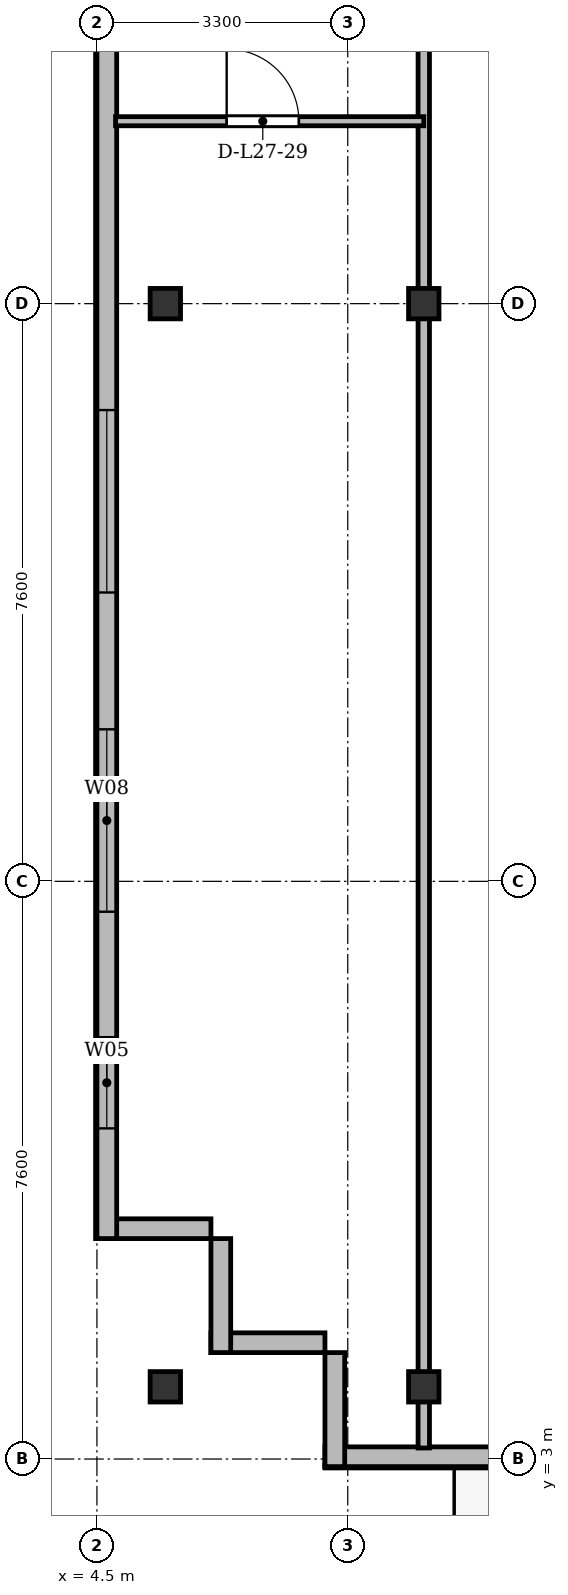
"""IFC4 building model, lengths in metres.
Left out: names, types, materials, properties, quantities, classifications, styles, units other than length and angle.
Written with IfcOpenShell. Run it as: python <this file> out.ifc"""

import sys

from ifc_helpers import new_model, si_unit, direction, frame, frame_2d, origin, origin_2d, place, context, subcontext, project, spatial, rectangle, i_section, extrude, source, transform, mapped, element, fill, save


model = new_model("IFC4")
c1 = context("Model", 3, precision=1e-05, world=origin(), true_north=direction((0.0, 1.0)))
c2 = subcontext(c1, "Body", "Model", "MODEL_VIEW")
j1 = project(units=[si_unit("LENGTHUNIT", "METRE"), si_unit("PLANEANGLEUNIT", "RADIAN")], contexts=[c1])
p1 = place(None, origin())
s1 = spatial("IfcSite", under=j1, at=p1, CompositionType="ELEMENT")
p2 = place(p1, origin())
s2 = spatial("IfcBuilding", under=s1, at=p2, CompositionType="ELEMENT")
p3 = place(p2, frame((0.0, 0.0, 106.9)))
s3 = spatial("IfcBuildingStorey", under=s2, at=p3, CompositionType="ELEMENT", Elevation=106.9)
m1 = source(origin(), c2, "Body", "SweptSolid", [
    extrude(i_section(OverallWidth=0.4, OverallDepth=0.4, WebThickness=0.022, FlangeThickness=0.035, at=origin_2d()), origin(), (0.0, 0.0, 1.0), 3.6),
])
for number, where, z_axis, x_axis in (
    (1, (5.4, 3.95, 0.0), (0.0, 0.0, 1.0), (1.0, 0.0, 0.0)),
    (2, (5.4, 18.2, 0.0), (0.0, 0.0, 1.0), (1.0, 0.0, 0.0)),
    (3, (8.8, 3.95, 0.0), (0.0, 0.0, 1.0), (1.0, 0.0, 0.0)),
    (4, (8.8, 18.2, 0.0), (0.0, 0.0, 1.0), (1.0, 0.0, 0.0)),
):
    element("IfcColumn", number, at=place(p3, frame(where, z_axis=z_axis, x_axis=x_axis)), inside=s3, PredefinedType="COLUMN", context=c2, shape_type="MappedRepresentation", body=[
        mapped(m1, transform((0.0, 0.0, 0.0), x_axis=(1.0, 0.0, 0.0), y_axis=(0.0, 1.0, 0.0), z_axis=(0.0, 0.0, 1.0), scale=1.0)),
    ])
for number, where, z_axis, x_axis in (
    (5, (7.5, 4.53, 0.0), (0.0, 0.0, 1.0), (-1.0, 0.0, 0.0)),
    (6, (6.13, 4.4, 0.0), (0.0, 0.0, 1.0), (0.0, 1.0, 0.0)),
):
    element("IfcWall", number, at=place(p3, frame(where, z_axis=z_axis, x_axis=x_axis)), inside=s3, PredefinedType="SOLIDWALL", context=c2, shape_type="SweptSolid", body=[
        extrude(rectangle(XDim=1.5, YDim=0.26, at=frame_2d((0.75, 0.0))), origin(), (0.0, 0.0, 1.0), 3.34),
    ])
p4 = place(p3, frame((6.0, 6.03, 0.0), z_axis=(0.0, 0.0, 1.0), x_axis=(-1.0, 0.0, 0.0)))
e7 = element("IfcWall", 7, at=p4, inside=s3, PredefinedType="SOLIDWALL", context=c2, shape_type="SweptSolid", body=[
    extrude(rectangle(XDim=1.5, YDim=0.26, at=frame_2d((0.75, 0.0))), origin(), (0.0, 0.0, 1.0), 2.84),
])
p5 = place(p3, frame((4.63, 5.9, 0.0), z_axis=(0.0, 0.0, 1.0), x_axis=(0.0, 1.0, 0.0)))
e8 = element("IfcWall", 8, at=p5, inside=s3, PredefinedType="SOLIDWALL", context=c2, shape_type="SweptSolid", body=[
    extrude(rectangle(XDim=39.6, YDim=0.26, at=frame_2d((19.8, 0.0))), origin(), (0.0, 0.0, 1.0), 3.34),
])
p6 = place(p5, frame((1.45, 0.0, 0.92)))
e9 = element("IfcOpeningElement", 9, at=p6, cuts=e8, PredefinedType="OPENING", context=c2, shape_type="SweptSolid", body=[
    extrude(rectangle(XDim=1.2, YDim=1.65, at=frame_2d((0.6, 0.825))), frame((0.0, 0.14, 0.0), z_axis=(0.0, -1.0, 0.0), x_axis=(1.0, 0.0, 0.0)), (0.0, 0.0, 1.0), 0.28),
])
p7 = place(p5, frame((4.3, 0.0, 0.92)))
e10 = element("IfcOpeningElement", 10, at=p7, cuts=e8, PredefinedType="OPENING", context=c2, shape_type="SweptSolid", body=[
    extrude(rectangle(XDim=2.4, YDim=2.1, at=frame_2d((1.2, 1.05))), frame((0.0, 0.14, 0.0), z_axis=(0.0, -1.0, 0.0), x_axis=(1.0, 0.0, 0.0)), (0.0, 0.0, 1.0), 0.28),
])
p8 = place(p5, frame((8.5, 0.0, 0.92)))
e11 = element("IfcOpeningElement", 11, at=p8, cuts=e8, PredefinedType="OPENING", context=c2, shape_type="SweptSolid", body=[
    extrude(rectangle(XDim=2.4, YDim=2.1, at=frame_2d((1.2, 1.05))), frame((0.0, 0.14, 0.0), z_axis=(0.0, -1.0, 0.0), x_axis=(1.0, 0.0, 0.0)), (0.0, 0.0, 1.0), 0.28),
])
p9 = place(p5, frame((15.7, 0.0, 0.92)))
e12 = element("IfcOpeningElement", 12, at=p9, cuts=e8, PredefinedType="OPENING", context=c2, shape_type="SweptSolid", body=[
    extrude(rectangle(XDim=2.4, YDim=2.1, at=frame_2d((1.2, 1.05))), frame((0.0, 0.14, 0.0), z_axis=(0.0, -1.0, 0.0), x_axis=(1.0, 0.0, 0.0)), (0.0, 0.0, 1.0), 0.28),
])
p10 = place(p5, frame((29.7, 0.0, 0.92)))
e13 = element("IfcOpeningElement", 13, at=p10, cuts=e8, PredefinedType="OPENING", context=c2, shape_type="SweptSolid", body=[
    extrude(rectangle(XDim=2.4, YDim=2.1, at=frame_2d((1.2, 1.05))), frame((0.0, 0.14, 0.0), z_axis=(0.0, -1.0, 0.0), x_axis=(1.0, 0.0, 0.0)), (0.0, 0.0, 1.0), 0.28),
])
p11 = place(p5, frame((33.9, 0.0, 0.92)))
e14 = element("IfcOpeningElement", 14, at=p11, cuts=e8, PredefinedType="OPENING", context=c2, shape_type="SweptSolid", body=[
    extrude(rectangle(XDim=1.2, YDim=1.65, at=frame_2d((0.6, 0.825))), frame((0.0, 0.14, 0.0), z_axis=(0.0, -1.0, 0.0), x_axis=(1.0, 0.0, 0.0)), (0.0, 0.0, 1.0), 0.28),
])
p12 = place(p5, frame((37.25, 0.0, 0.92)))
e15 = element("IfcOpeningElement", 15, at=p12, cuts=e8, PredefinedType="OPENING", context=c2, shape_type="SweptSolid", body=[
    extrude(rectangle(XDim=1.2, YDim=1.65, at=frame_2d((0.6, 0.825))), frame((0.0, 0.14, 0.0), z_axis=(0.0, -1.0, 0.0), x_axis=(1.0, 0.0, 0.0)), (0.0, 0.0, 1.0), 0.28),
])
p13 = place(p3, frame((66.9, 3.03, 0.0), z_axis=(0.0, 0.0, 1.0), x_axis=(-1.0, 0.0, 0.0)))
e16 = element("IfcWall", 16, at=p13, inside=s3, PredefinedType="SOLIDWALL", context=c2, shape_type="SweptSolid", body=[
    extrude(rectangle(XDim=59.4, YDim=0.26, at=frame_2d((29.7, 0.0))), origin(), (0.0, 0.0, 1.0), 3.34),
])
p14 = place(p13, frame((2.0, 0.0, 0.9)))
e17 = element("IfcOpeningElement", 17, at=p14, cuts=e16, PredefinedType="OPENING", context=c2, shape_type="SweptSolid", body=[
    extrude(rectangle(XDim=2.0, YDim=1.95, at=frame_2d((1.0, 0.975))), frame((0.0, 0.14, 0.0), z_axis=(0.0, -1.0, 0.0), x_axis=(1.0, 0.0, 0.0)), (0.0, 0.0, 1.0), 0.28),
])
p15 = place(p13, frame((5.575, 0.0, 0.9)))
e18 = element("IfcOpeningElement", 18, at=p15, cuts=e16, PredefinedType="OPENING", context=c2, shape_type="SweptSolid", body=[
    extrude(rectangle(XDim=1.65, YDim=1.85, at=frame_2d((0.825, 0.925))), frame((0.0, 0.14, 0.0), z_axis=(0.0, -1.0, 0.0), x_axis=(1.0, 0.0, 0.0)), (0.0, 0.0, 1.0), 0.28),
])
p16 = place(p13, frame((9.213, 0.0, 0.0)))
e19 = element("IfcOpeningElement", 19, at=p16, cuts=e16, PredefinedType="OPENING", context=c2, shape_type="SweptSolid", body=[
    extrude(rectangle(XDim=1.2, YDim=2.2, at=frame_2d((0.6, 1.1))), frame((0.0, 0.14, 0.0), z_axis=(0.0, -1.0, 0.0), x_axis=(1.0, 0.0, 0.0)), (0.0, 0.0, 1.0), 0.28),
])
p17 = place(p13, frame((12.8, 0.0, 0.9)))
e20 = element("IfcOpeningElement", 20, at=p17, cuts=e16, PredefinedType="OPENING", context=c2, shape_type="SweptSolid", body=[
    extrude(rectangle(XDim=2.2, YDim=1.8, at=frame_2d((1.1, 0.9))), frame((0.0, 0.14, 0.0), z_axis=(0.0, -1.0, 0.0), x_axis=(1.0, 0.0, 0.0)), (0.0, 0.0, 1.0), 0.28),
])
p18 = place(p13, frame((16.95, 0.0, 0.9)))
e21 = element("IfcOpeningElement", 21, at=p18, cuts=e16, PredefinedType="OPENING", context=c2, shape_type="SweptSolid", body=[
    extrude(rectangle(XDim=1.5, YDim=1.75, at=frame_2d((0.75, 0.875))), frame((0.0, 0.14, 0.0), z_axis=(0.0, -1.0, 0.0), x_axis=(1.0, 0.0, 0.0)), (0.0, 0.0, 1.0), 0.28),
])
p19 = place(p13, frame((20.3, 0.0, 0.9)))
e22 = element("IfcOpeningElement", 22, at=p19, cuts=e16, PredefinedType="OPENING", context=c2, shape_type="SweptSolid", body=[
    extrude(rectangle(XDim=2.0, YDim=1.95, at=frame_2d((1.0, 0.975))), frame((0.0, 0.14, 0.0), z_axis=(0.0, -1.0, 0.0), x_axis=(1.0, 0.0, 0.0)), (0.0, 0.0, 1.0), 0.28),
])
p20 = place(p13, frame((25.575, 0.0, 0.9)))
e23 = element("IfcOpeningElement", 23, at=p20, cuts=e16, PredefinedType="OPENING", context=c2, shape_type="SweptSolid", body=[
    extrude(rectangle(XDim=1.65, YDim=1.85, at=frame_2d((0.825, 0.925))), frame((0.0, 0.14, 0.0), z_axis=(0.0, -1.0, 0.0), x_axis=(1.0, 0.0, 0.0)), (0.0, 0.0, 1.0), 0.28),
])
p21 = place(p13, frame((32.1, 0.0, 0.9)))
e24 = element("IfcOpeningElement", 24, at=p21, cuts=e16, PredefinedType="OPENING", context=c2, shape_type="SweptSolid", body=[
    extrude(rectangle(XDim=1.8, YDim=1.8, at=frame_2d((0.9, 0.9))), frame((0.0, 0.14, 0.0), z_axis=(0.0, -1.0, 0.0), x_axis=(1.0, 0.0, 0.0)), (0.0, 0.0, 1.0), 0.28),
])
p22 = place(p13, frame((37.584, 0.0, 0.0)))
e25 = element("IfcOpeningElement", 25, at=p22, cuts=e16, PredefinedType="OPENING", context=c2, shape_type="SweptSolid", body=[
    extrude(rectangle(XDim=1.2, YDim=2.2, at=frame_2d((0.6, 1.1))), frame((0.0, 0.14, 0.0), z_axis=(0.0, -1.0, 0.0), x_axis=(1.0, 0.0, 0.0)), (0.0, 0.0, 1.0), 0.28),
])
p23 = place(p13, frame((40.85, 0.0, 0.9)))
e26 = element("IfcOpeningElement", 26, at=p23, cuts=e16, PredefinedType="OPENING", context=c2, shape_type="SweptSolid", body=[
    extrude(rectangle(XDim=1.5, YDim=1.75, at=frame_2d((0.75, 0.875))), frame((0.0, 0.14, 0.0), z_axis=(0.0, -1.0, 0.0), x_axis=(1.0, 0.0, 0.0)), (0.0, 0.0, 1.0), 0.28),
])
p24 = place(p13, frame((46.4, 0.0, 0.9)))
e27 = element("IfcOpeningElement", 27, at=p24, cuts=e16, PredefinedType="OPENING", context=c2, shape_type="SweptSolid", body=[
    extrude(rectangle(XDim=2.0, YDim=1.95, at=frame_2d((1.0, 0.975))), frame((0.0, 0.14, 0.0), z_axis=(0.0, -1.0, 0.0), x_axis=(1.0, 0.0, 0.0)), (0.0, 0.0, 1.0), 0.28),
])
p25 = place(p13, frame((55.817, 0.0, 0.0)))
e28 = element("IfcOpeningElement", 28, at=p25, cuts=e16, PredefinedType="OPENING", context=c2, shape_type="SweptSolid", body=[
    extrude(rectangle(XDim=1.2, YDim=2.2, at=frame_2d((0.6, 1.1))), frame((0.0, 0.14, 0.0), z_axis=(0.0, -1.0, 0.0), x_axis=(1.0, 0.0, 0.0)), (0.0, 0.0, 1.0), 0.28),
])
p26 = place(p3, frame((7.63, 2.9, 0.0), z_axis=(0.0, 0.0, 1.0), x_axis=(0.0, 1.0, 0.0)))
e29 = element("IfcWall", 29, at=p26, inside=s3, PredefinedType="SOLIDWALL", context=c2, shape_type="SweptSolid", body=[
    extrude(rectangle(XDim=1.5, YDim=0.26, at=frame_2d((0.75, 0.0))), origin(), (0.0, 0.0, 1.0), 2.752),
])
p27 = place(p3, frame((8.8, 3.145, 0.0), z_axis=(0.0, 0.0, 1.0), x_axis=(0.0, 1.0, 0.0)))
e30 = element("IfcWall", 30, at=p27, inside=s3, PredefinedType="PARTITIONING", context=c2, shape_type="SweptSolid", body=[
    extrude(rectangle(XDim=24.455, YDim=0.15, at=frame_2d((12.228, 0.0))), origin(), (0.0, 0.0, 1.0), 2.84),
])
p28 = place(p3, frame((4.745, 20.6, 0.0), z_axis=(0.0, 0.0, 1.0), x_axis=(1.0, 0.0, 0.0)))
e31 = element("IfcWall", 31, at=p28, inside=s3, PredefinedType="PARTITIONING", context=c2, shape_type="SweptSolid", body=[
    extrude(rectangle(XDim=4.055, YDim=0.12, at=frame_2d((2.027, 0.0))), origin(), (0.0, 0.0, 1.0), 2.84),
])
p29 = place(p28, frame((1.462, 0.0, 0.0)))
e32 = element("IfcOpeningElement", 32, at=p29, cuts=e31, PredefinedType="OPENING", context=c2, shape_type="SweptSolid", body=[
    extrude(rectangle(XDim=0.95, YDim=2.15, at=frame_2d((0.475, 1.075))), frame((0.0, 0.07, 0.0), z_axis=(0.0, -1.0, 0.0), x_axis=(1.0, 0.0, 0.0)), (0.0, 0.0, 1.0), 0.14),
])
m2 = source(origin(), c2, "Body", "SweptSolid", [
    extrude(rectangle(XDim=1.2, YDim=1.65, at=frame_2d((0.6, 0.825))), frame((0.0, 0.03, 0.0), z_axis=(0.0, -1.0, 0.0), x_axis=(1.0, 0.0, 0.0)), (0.0, 0.0, 1.0), 0.06),
])
p30 = place(p6, origin())
e33 = element("IfcWindow", 33, at=p30, inside=s3, PartitioningType="SINGLE_PANEL", PredefinedType="WINDOW", context=c2, shape_type="MappedRepresentation", body=[
    mapped(m2, transform((0.0, 0.0, 0.0), x_axis=(1.0, 0.0, 0.0), y_axis=(0.0, 1.0, 0.0), z_axis=(0.0, 0.0, 1.0), scale=1.0)),
])
fill(e9, e33)
m3 = source(origin(), c2, "Body", "SweptSolid", [
    extrude(rectangle(XDim=2.4, YDim=2.1, at=frame_2d((1.2, 1.05))), frame((0.0, 0.03, 0.0), z_axis=(0.0, -1.0, 0.0), x_axis=(1.0, 0.0, 0.0)), (0.0, 0.0, 1.0), 0.06),
])
p31 = place(p7, origin())
e34 = element("IfcWindow", 34, at=p31, inside=s3, PartitioningType="SINGLE_PANEL", PredefinedType="WINDOW", context=c2, shape_type="MappedRepresentation", body=[
    mapped(m3, transform((0.0, 0.0, 0.0), x_axis=(1.0, 0.0, 0.0), y_axis=(0.0, 1.0, 0.0), z_axis=(0.0, 0.0, 1.0), scale=1.0)),
])
fill(e10, e34)
p32 = place(p8, origin())
e35 = element("IfcWindow", 35, at=p32, inside=s3, PartitioningType="SINGLE_PANEL", PredefinedType="WINDOW", context=c2, shape_type="MappedRepresentation", body=[
    mapped(m3, transform((0.0, 0.0, 0.0), x_axis=(1.0, 0.0, 0.0), y_axis=(0.0, 1.0, 0.0), z_axis=(0.0, 0.0, 1.0), scale=1.0)),
])
fill(e11, e35)
m4 = source(origin(), c2, "Body", "SweptSolid", [
    extrude(rectangle(XDim=0.95, YDim=2.15, at=frame_2d((0.475, 1.075))), frame((0.0, 0.025, 0.0), z_axis=(0.0, -1.0, 0.0), x_axis=(1.0, 0.0, 0.0)), (0.0, 0.0, 1.0), 0.05),
])
p33 = place(p29, origin())
e36 = element("IfcDoor", 36, at=p33, inside=s3, OperationType="SINGLE_SWING_LEFT", PredefinedType="DOOR", context=c2, shape_type="MappedRepresentation", body=[
    mapped(m4, transform((0.0, 0.0, 0.0), x_axis=(1.0, 0.0, 0.0), y_axis=(0.0, 1.0, 0.0), z_axis=(0.0, 0.0, 1.0), scale=1.0)),
])
fill(e32, e36)
save(model, sys.argv[1])
